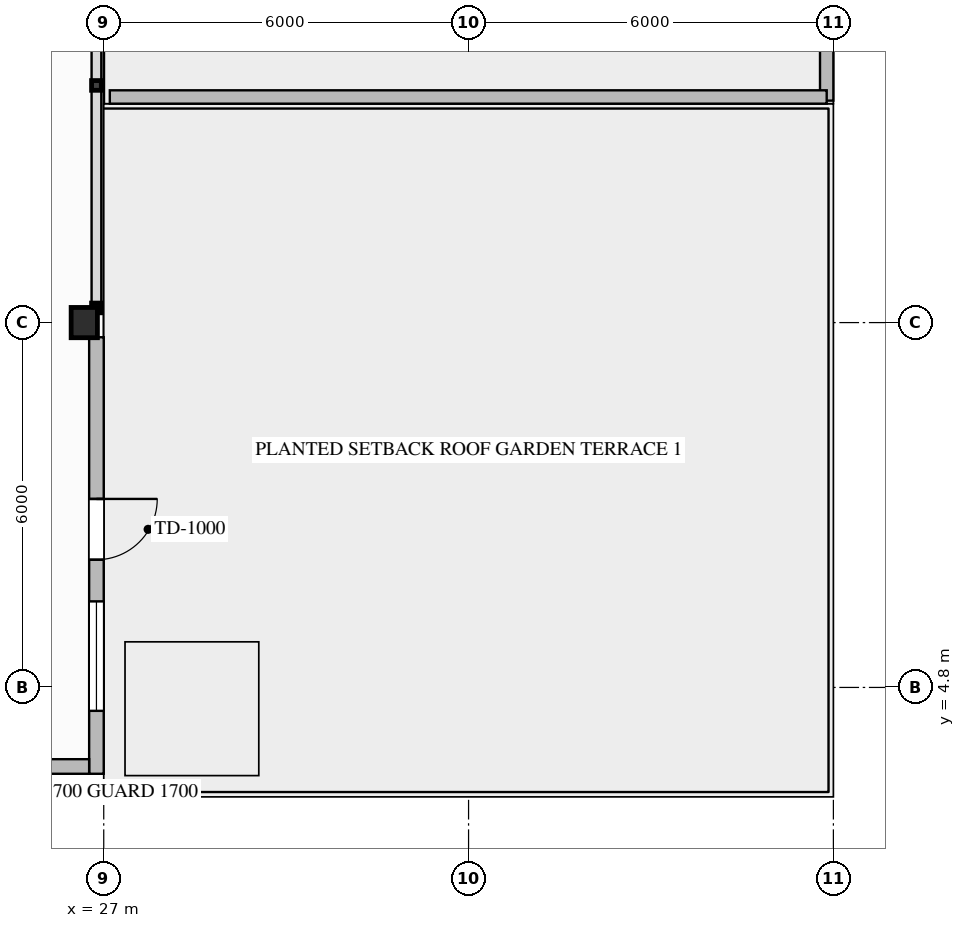
"""IFC4 building model, lengths in metres.
Left out: names, types, materials, properties, quantities, classifications, styles, units other than length and angle.
Written with IfcOpenShell. Run it as: python <this file> out.ifc"""

import sys

from ifc_helpers import new_model, si_unit, direction, frame, frame_2d, origin, origin_2d, place, context, subcontext, project, spatial, rectangle, i_section, extrude, element, fill, save


model = new_model("IFC4")
c1 = context("Model", 3, precision=1e-05, world=origin(), true_north=direction((0.0, 1.0)))
c2 = subcontext(c1, "Body", "Model", "MODEL_VIEW")
j1 = project(units=[si_unit("LENGTHUNIT", "METRE"), si_unit("PLANEANGLEUNIT", "RADIAN")], contexts=[c1])
p1 = place(None, origin())
s1 = spatial("IfcSite", under=j1, at=p1, CompositionType="ELEMENT")
p2 = place(p1, origin())
s2 = spatial("IfcBuilding", under=s1, at=p2, CompositionType="ELEMENT")
p3 = place(p2, frame((0.0, 0.0, 33.2)))
s3 = spatial("IfcBuildingStorey", under=s2, at=p3, CompositionType="ELEMENT", Elevation=33.2)
p4 = place(p3, frame((26.68, 10.8, -0.26), z_axis=(0.0, 0.0, 1.0), x_axis=(1.0, 0.0, 0.0)))
e1 = element("IfcColumn", 1, at=p4, inside=s3, PredefinedType="COLUMN", context=c2, shape_type="SweptSolid", body=[
    extrude(i_section(OverallWidth=0.432, OverallDepth=0.498, WebThickness=0.056, FlangeThickness=0.089, FilletRadius=0.03, at=origin_2d()), origin(), (0.0, 0.0, 1.0), 3.757),
])
p5 = place(p3, frame((38.89, 39.55, 0.0), z_axis=(0.0, 0.0, 1.0), x_axis=(0.0, -1.0, 0.0)))
e2 = element("IfcWall", 2, at=p5, inside=s3, PredefinedType="PARAPET", context=c2, shape_type="SweptSolid", body=[
    extrude(rectangle(XDim=25.1, YDim=0.22, at=frame_2d((12.55, 0.0))), origin(), (0.0, 0.0, 1.0), 1.2),
])
p6 = place(p3, frame((38.89, 14.51, 0.0), z_axis=(0.0, 0.0, 1.0), x_axis=(-1.0, 0.0, 0.0)))
e3 = element("IfcWall", 3, at=p6, inside=s3, PredefinedType="PARAPET", context=c2, shape_type="SweptSolid", body=[
    extrude(rectangle(XDim=11.79, YDim=0.22, at=frame_2d((5.895, 0.0))), origin(), (0.0, 0.0, 1.0), 1.2),
])
p7 = place(p3, frame((26.88, 10.559, 0.0), z_axis=(0.0, 0.0, 1.0), x_axis=(0.0, -1.0, 0.0)))
e4 = element("IfcWall", 4, at=p7, inside=s3, PredefinedType="STANDARD", context=c2, shape_type="SweptSolid", body=[
    extrude(rectangle(XDim=7.179, YDim=0.24, at=frame_2d((3.59, 0.0))), origin(), (0.0, 0.0, 1.0), 3.24),
])
p8 = place(p7, frame((2.659, 0.0, 0.0)))
e5 = element("IfcOpeningElement", 5, at=p8, cuts=e4, PredefinedType="OPENING", context=c2, shape_type="SweptSolid", body=[
    extrude(rectangle(XDim=1.0, YDim=2.2, at=frame_2d((0.5, 1.1))), frame((0.0, 0.13, 0.0), z_axis=(0.0, -1.0, 0.0), x_axis=(1.0, 0.0, 0.0)), (0.0, 0.0, 1.0), 0.26),
])
p9 = place(p7, frame((4.344, 0.0, 0.75)))
e6 = element("IfcOpeningElement", 6, at=p9, cuts=e4, PredefinedType="OPENING", context=c2, shape_type="SweptSolid", body=[
    extrude(rectangle(XDim=1.8, YDim=2.05, at=frame_2d((0.9, 1.025))), frame((0.0, 0.13, 0.0), z_axis=(0.0, -1.0, 0.0), x_axis=(1.0, 0.0, 0.0)), (0.0, 0.0, 1.0), 0.26),
])
p10 = place(p3, frame((26.76, 3.5, 0.0), z_axis=(0.0, 0.0, 1.0), x_axis=(-1.0, 0.0, 0.0)))
e7 = element("IfcWall", 7, at=p10, inside=s3, PredefinedType="STANDARD", context=c2, shape_type="SweptSolid", body=[
    extrude(rectangle(XDim=3.26, YDim=0.24, at=frame_2d((1.63, 0.0))), origin(), (0.0, 0.0, 1.0), 3.24),
])
p11 = place(p8, origin())
e8 = element("IfcDoor", 8, at=p11, inside=s3, OperationType="SINGLE_SWING_LEFT", PredefinedType="DOOR", context=c2, shape_type="SweptSolid", body=[
    extrude(rectangle(XDim=1.0, YDim=2.2, at=frame_2d((0.5, 1.1))), frame((0.0, 0.025, 0.0), z_axis=(0.0, -1.0, 0.0), x_axis=(1.0, 0.0, 0.0)), (0.0, 0.0, 1.0), 0.05),
])
fill(e5, e8)
p12 = place(p9, origin())
e9 = element("IfcWindow", 9, at=p12, inside=s3, PartitioningType="SINGLE_PANEL", PredefinedType="WINDOW", context=c2, shape_type="SweptSolid", body=[
    extrude(rectangle(XDim=1.8, YDim=2.05, at=frame_2d((0.9, 1.025))), frame((0.0, 0.03, 0.0), z_axis=(0.0, -1.0, 0.0), x_axis=(1.0, 0.0, 0.0)), (0.0, 0.0, 1.0), 0.06),
])
fill(e6, e9)
save(model, sys.argv[1])
